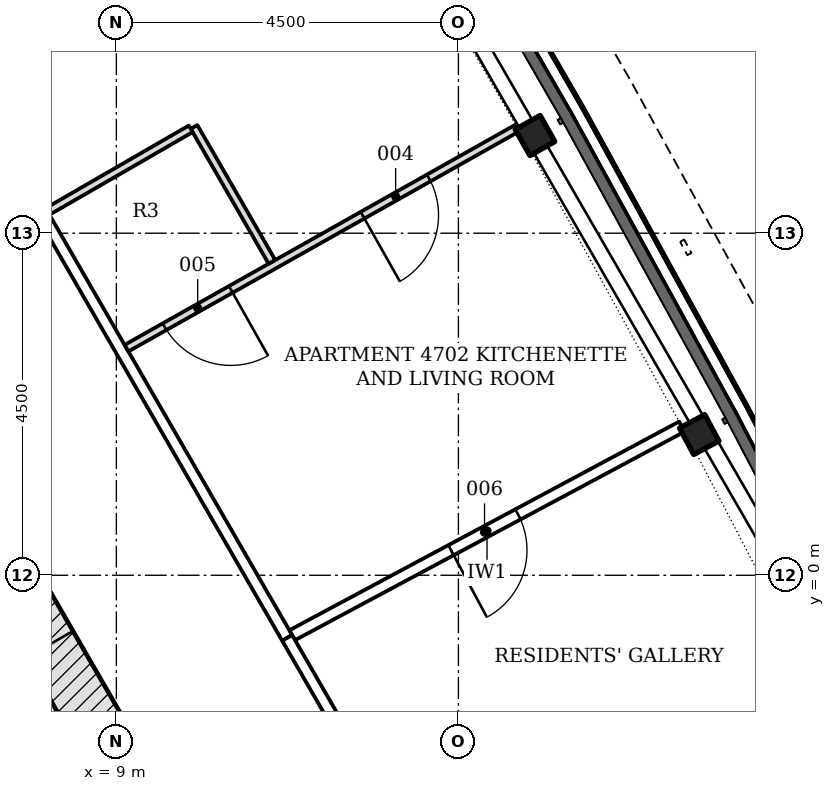
"""IFC4 building model, lengths in metres.
Left out: names, types, materials, properties, quantities, classifications, styles, units other than length and angle.
Written with IfcOpenShell. Run it as: python <this file> out.ifc"""

import sys

from ifc_helpers import new_model, si_unit, direction, frame, frame_2d, origin, origin_2d, place, context, subcontext, project, spatial, polyline, rectangle, i_section, outline, extrude, element, fill, save


model = new_model("IFC4")
c1 = context("Model", 3, precision=1e-05, world=origin(), true_north=direction((0.0, 1.0)))
c2 = subcontext(c1, "Body", "Model", "MODEL_VIEW")
j1 = project(units=[si_unit("LENGTHUNIT", "METRE"), si_unit("PLANEANGLEUNIT", "RADIAN")], contexts=[c1])
p1 = place(None, origin())
s1 = spatial("IfcSite", under=j1, at=p1, CompositionType="ELEMENT")
p2 = place(p1, origin())
s2 = spatial("IfcBuilding", under=s1, at=p2, CompositionType="ELEMENT")
p3 = place(p2, frame((0.0, 0.0, 185.1)))
s3 = spatial("IfcBuildingStorey", under=s2, at=p3, CompositionType="ELEMENT", Elevation=185.1)
p4 = place(p3, frame((10.311, -4.703, -0.2), z_axis=(0.0, 0.0, 1.0), x_axis=(-0.500001446645, 0.866024568562, 0.0)))
e1 = element("IfcWall", 1, at=p4, inside=s3, PredefinedType="SHEAR", context=c2, shape_type="SweptSolid", body=[
    extrude(rectangle(XDim=18.458, YDim=0.7, at=frame_2d((9.229, 0.0))), origin(), (0.0, 0.0, 1.0), 3.6),
])
p5 = place(p4, frame((4.379, 0.0, 0.2)))
e2 = element("IfcOpeningElement", 2, at=p5, cuts=e1, PredefinedType="OPENING", context=c2, shape_type="SweptSolid", body=[
    extrude(rectangle(XDim=1.1, YDim=2.1, at=frame_2d((0.55, 1.05))), frame((0.0, 0.36, 0.0), z_axis=(0.0, -1.0, 0.0), x_axis=(1.0, 0.0, 0.0)), (0.0, 0.0, 1.0), 0.72),
])
p6 = place(p4, frame((6.529, 0.0, 0.2)))
e3 = element("IfcOpeningElement", 3, at=p6, cuts=e1, PredefinedType="OPENING", context=c2, shape_type="SweptSolid", body=[
    extrude(rectangle(XDim=1.1, YDim=2.1, at=frame_2d((0.55, 1.05))), frame((0.0, 0.36, 0.0), z_axis=(0.0, -1.0, 0.0), x_axis=(1.0, 0.0, 0.0)), (0.0, 0.0, 1.0), 0.72),
])
p7 = place(p4, frame((8.679, 0.0, 0.2)))
e4 = element("IfcOpeningElement", 4, at=p7, cuts=e1, PredefinedType="OPENING", context=c2, shape_type="SweptSolid", body=[
    extrude(rectangle(XDim=1.1, YDim=2.1, at=frame_2d((0.55, 1.05))), frame((0.0, 0.36, 0.0), z_axis=(0.0, -1.0, 0.0), x_axis=(1.0, 0.0, 0.0)), (0.0, 0.0, 1.0), 0.72),
])
p8 = place(p4, frame((10.829, 0.0, 0.2)))
e5 = element("IfcOpeningElement", 5, at=p8, cuts=e1, PredefinedType="OPENING", context=c2, shape_type="SweptSolid", body=[
    extrude(rectangle(XDim=1.1, YDim=2.1, at=frame_2d((0.55, 1.05))), frame((0.0, 0.36, 0.0), z_axis=(0.0, -1.0, 0.0), x_axis=(1.0, 0.0, 0.0)), (0.0, 0.0, 1.0), 0.72),
])
p9 = place(p4, frame((12.979, 0.0, 0.2)))
e6 = element("IfcOpeningElement", 6, at=p9, cuts=e1, PredefinedType="OPENING", context=c2, shape_type="SweptSolid", body=[
    extrude(rectangle(XDim=1.1, YDim=2.1, at=frame_2d((0.55, 1.05))), frame((0.0, 0.36, 0.0), z_axis=(0.0, -1.0, 0.0), x_axis=(1.0, 0.0, 0.0)), (0.0, 0.0, 1.0), 0.72),
])
for number, where, z_axis, x_axis in (
    (7, (16.668, 1.851, -0.2), (0.0, 0.0, 1.0), (-0.472, 0.882, 0.0)),
    (8, (14.508, 5.785, -0.2), (0.0, 0.0, 1.0), (-0.491, 0.871, 0.0)),
):
    element("IfcColumn", number, at=place(p3, frame(where, z_axis=z_axis, x_axis=x_axis)), inside=s3, PredefinedType="COLUMN", context=c2, shape_type="SweptSolid", body=[
        extrude(i_section(OverallWidth=0.394, OverallDepth=0.376, WebThickness=0.017, FlangeThickness=0.028, FilletRadius=0.015, at=origin_2d()), origin(), (0.0, 0.0, 1.0), 3.6),
    ])
p10 = place(p3, origin())
e9 = element("IfcWall", 9, at=p10, inside=s3, PredefinedType="PARAPET", context=c2, shape_type="SweptSolid", body=[
    extrude(outline(polyline([(22.265, -7.662), (24.846, -6.048), (27.171, -4.156), (29.169, -2.042), (30.78, 0.228), (31.954, 2.586), (32.656, 4.96), (32.864, 7.277), (32.572, 9.469), (31.789, 11.467), (30.539, 13.211), (28.86, 14.648), (26.802, 15.735), (24.429, 16.438), (21.812, 16.737), (19.031, 16.622), (16.171, 16.096), (13.317, 15.176), (10.558, 13.889), (10.664, 13.662), (13.409, 14.942), (16.232, 15.853), (19.059, 16.373), (21.803, 16.487), (24.379, 16.193), (26.708, 15.502), (28.719, 14.44), (30.354, 13.041), (31.568, 11.346), (32.328, 9.406), (32.612, 7.272), (32.409, 5.007), (31.72, 2.678), (30.565, 0.357), (28.976, -1.883), (27.001, -3.972), (24.7, -5.844), (22.132, -7.45), (22.265, -7.662)])), origin(), (0.0, 0.0, 1.0), 1.1),
])
p11 = place(p3, frame((11.247, -0.824, 0.0), z_axis=(0.0, 0.0, 1.0), x_axis=(-0.499997921847, 0.866026603603, 0.0)))
e10 = element("IfcWall", 10, at=p11, inside=s3, PredefinedType="PARTITIONING", context=c2, shape_type="SweptSolid", body=[
    extrude(rectangle(XDim=14.065, YDim=0.15, at=frame_2d((7.032, 0.0))), origin(), (0.0, 0.0, 1.0), 2.847),
])
p12 = place(p11, frame((11.953, 0.0, 0.0)))
e11 = element("IfcOpeningElement", 11, at=p12, cuts=e10, PredefinedType="OPENING", context=c2, shape_type="SweptSolid", body=[
    extrude(rectangle(XDim=1.0, YDim=2.1, at=frame_2d((0.5, 1.05))), frame((0.0, 0.085, 0.0), z_axis=(0.0, -1.0, 0.0), x_axis=(1.0, 0.0, 0.0)), (0.0, 0.0, 1.0), 0.17),
])
p13 = place(p3, frame((16.44, 1.956, 0.0), z_axis=(0.0, 0.0, 1.0), x_axis=(-0.881627849584, -0.471945266783, 0.0)))
e12 = element("IfcWall", 12, at=p13, inside=s3, PredefinedType="PARTITIONING", context=c2, shape_type="SweptSolid", body=[
    extrude(rectangle(XDim=5.815, YDim=0.15, at=frame_2d((2.907, 0.0))), origin(), (0.0, 0.0, 1.0), 3.4),
])
p14 = place(p13, frame((2.445, 0.0, 0.0)))
e13 = element("IfcOpeningElement", 13, at=p14, cuts=e12, PredefinedType="OPENING", context=c2, shape_type="SweptSolid", body=[
    extrude(rectangle(XDim=1.0, YDim=2.1, at=frame_2d((0.5, 1.05))), frame((0.0, 0.085, 0.0), z_axis=(0.0, -1.0, 0.0), x_axis=(1.0, 0.0, 0.0)), (0.0, 0.0, 1.0), 0.17),
])
p15 = place(p3, frame((13.429, -4.604, 0.0), z_axis=(0.0, 0.0, 1.0), x_axis=(-0.499995208485, 0.866028170149, 0.0)))
e14 = element("IfcWall", 14, at=p15, inside=s3, PredefinedType="PARTITIONING", context=c2, shape_type="SweptSolid", body=[
    extrude(rectangle(XDim=4.365, YDim=0.15, at=frame_2d((2.182, 0.0))), origin(), (0.0, 0.0, 1.0), 2.852),
])
p16 = place(p15, frame((1.432, 0.0, 0.0)))
e15 = element("IfcOpeningElement", 15, at=p16, cuts=e14, PredefinedType="OPENING", context=c2, shape_type="SweptSolid", body=[
    extrude(rectangle(XDim=1.5, YDim=2.1, at=frame_2d((0.75, 1.05))), frame((0.0, 0.085, 0.0), z_axis=(0.0, -1.0, 0.0), x_axis=(1.0, 0.0, 0.0)), (0.0, 0.0, 1.0), 0.17),
])
p17 = place(p3, frame((14.277, 5.885, 0.0), z_axis=(0.0, 0.0, 1.0), x_axis=(-0.871335785584, -0.490687220907, 0.0)))
e16 = element("IfcWall", 16, at=p17, inside=s3, PredefinedType="PARTITIONING", context=c2, shape_type="SweptSolid", body=[
    extrude(rectangle(XDim=5.904, YDim=0.1, at=frame_2d((2.952, 0.0))), origin(), (0.0, 0.0, 1.0), 3.4),
])
p18 = place(p17, frame((1.339, 0.0, 0.0)))
e17 = element("IfcOpeningElement", 17, at=p18, cuts=e16, PredefinedType="OPENING", context=c2, shape_type="SweptSolid", body=[
    extrude(rectangle(XDim=1.0, YDim=2.1, at=frame_2d((0.5, 1.05))), frame((0.0, 0.06, 0.0), z_axis=(0.0, -1.0, 0.0), x_axis=(1.0, 0.0, 0.0)), (0.0, 0.0, 1.0), 0.12),
])
p19 = place(p17, frame((4.329, 0.0, 0.0)))
e18 = element("IfcOpeningElement", 18, at=p19, cuts=e16, PredefinedType="OPENING", context=c2, shape_type="SweptSolid", body=[
    extrude(rectangle(XDim=1.0, YDim=2.1, at=frame_2d((0.5, 1.05))), frame((0.0, 0.06, 0.0), z_axis=(0.0, -1.0, 0.0), x_axis=(1.0, 0.0, 0.0)), (0.0, 0.0, 1.0), 0.12),
])
p20 = place(p3, frame((11.047, 4.123, 0.0), z_axis=(0.0, 0.0, 1.0), x_axis=(-0.500007699544, 0.866020958405, 0.0)))
e19 = element("IfcWall", 19, at=p20, inside=s3, PredefinedType="PARTITIONING", context=c2, shape_type="SweptSolid", body=[
    extrude(rectangle(XDim=2.05, YDim=0.1, at=frame_2d((1.025, 0.0))), origin(), (0.0, 0.0, 1.0), 3.4),
])
p21 = place(p3, frame((9.979, 5.873, 0.0), z_axis=(0.0, 0.0, 1.0), x_axis=(-0.866037911478, -0.499978335414, 0.0)))
e20 = element("IfcWall", 20, at=p21, inside=s3, PredefinedType="PARTITIONING", context=c2, shape_type="SweptSolid", body=[
    extrude(rectangle(XDim=2.175, YDim=0.1, at=frame_2d((1.087, 0.0))), origin(), (0.0, 0.0, 1.0), 3.4),
])
p22 = place(p3, frame((12.031, 9.766, 0.0), z_axis=(0.0, 0.0, 1.0), x_axis=(-0.860638865546, -0.509215811922, 0.0)))
e21 = element("IfcWall", 21, at=p22, inside=s3, PredefinedType="PARTITIONING", context=c2, shape_type="SweptSolid", body=[
    extrude(rectangle(XDim=5.9, YDim=0.15, at=frame_2d((2.95, 0.0))), origin(), (0.0, 0.0, 1.0), 3.4),
])
p23 = place(p18, origin())
e22 = element("IfcDoor", 22, at=p23, inside=s3, OperationType="SINGLE_SWING_RIGHT", PredefinedType="DOOR", context=c2, shape_type="SweptSolid", body=[
    extrude(rectangle(XDim=1.0, YDim=2.1, at=frame_2d((0.5, 1.05))), frame((0.0, 0.025, 0.0), z_axis=(0.0, -1.0, 0.0), x_axis=(1.0, 0.0, 0.0)), (0.0, 0.0, 1.0), 0.05),
])
fill(e17, e22)
p24 = place(p19, origin())
e23 = element("IfcDoor", 23, at=p24, inside=s3, OperationType="SINGLE_SWING_LEFT", PredefinedType="DOOR", context=c2, shape_type="SweptSolid", body=[
    extrude(rectangle(XDim=1.0, YDim=2.1, at=frame_2d((0.5, 1.05))), frame((0.0, 0.025, 0.0), z_axis=(0.0, -1.0, 0.0), x_axis=(1.0, 0.0, 0.0)), (0.0, 0.0, 1.0), 0.05),
])
fill(e18, e23)
p25 = place(p14, origin())
e24 = element("IfcDoor", 24, at=p25, inside=s3, OperationType="SINGLE_SWING_RIGHT", PredefinedType="DOOR", context=c2, shape_type="SweptSolid", body=[
    extrude(rectangle(XDim=1.0, YDim=2.1, at=frame_2d((0.5, 1.05))), frame((0.0, 0.025, 0.0), z_axis=(0.0, -1.0, 0.0), x_axis=(1.0, 0.0, 0.0)), (0.0, 0.0, 1.0), 0.05),
])
fill(e13, e24)
save(model, sys.argv[1])
